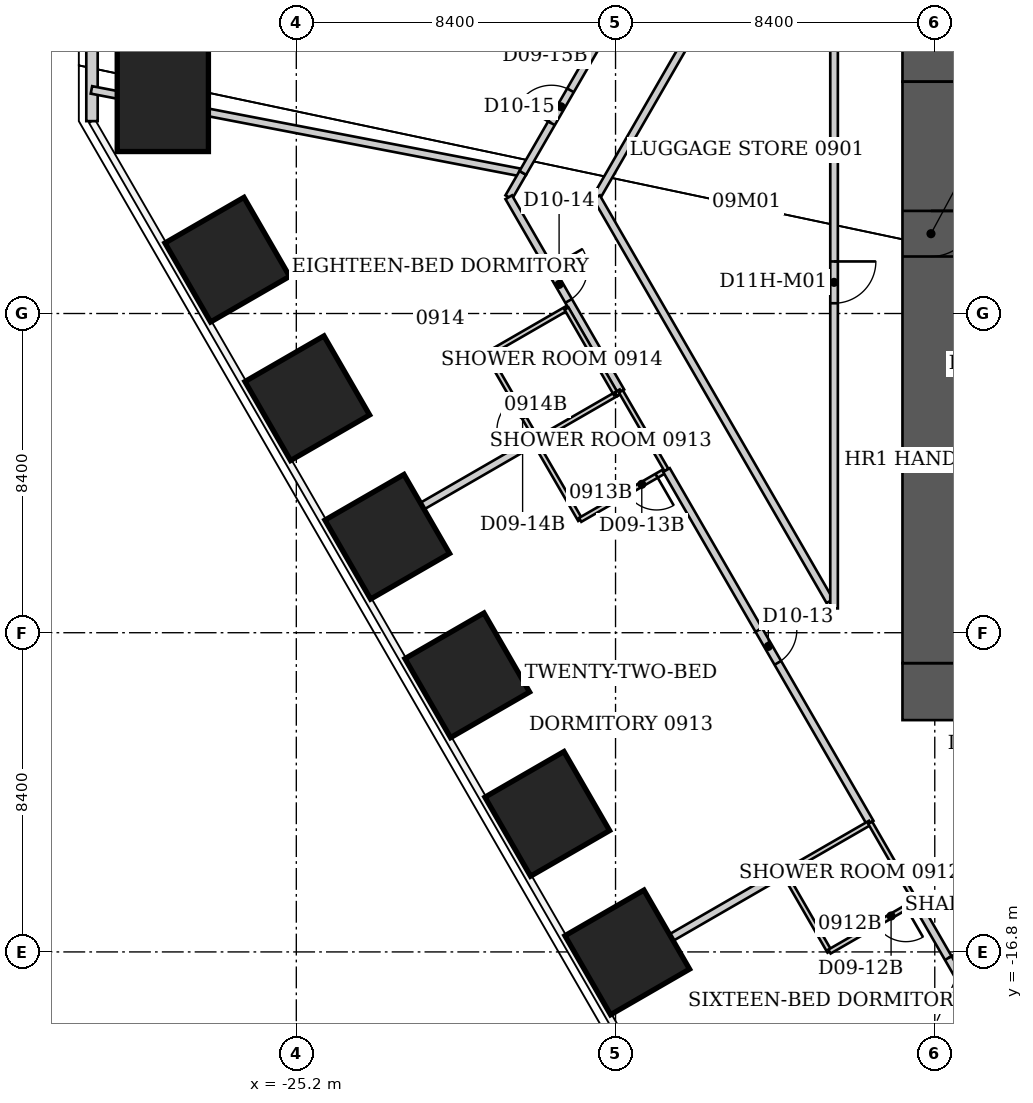
"""IFC4 building model, lengths in metres.
Left out: names, types, materials, properties, quantities, classifications, styles, units other than length and angle.
Written with IfcOpenShell. Run it as: python <this file> out.ifc"""

import sys

from ifc_helpers import new_model, si_unit, direction, frame, frame_2d, origin, origin_2d, place, context, subcontext, project, spatial, rectangle, extrude, element, fill, save


model = new_model("IFC4")
c1 = context("Model", 3, precision=1e-05, world=origin(), true_north=direction((0.0, 1.0)))
c2 = subcontext(c1, "Body", "Model", "MODEL_VIEW")
j1 = project(units=[si_unit("LENGTHUNIT", "METRE"), si_unit("PLANEANGLEUNIT", "RADIAN")], contexts=[c1])
p1 = place(None, origin())
s1 = spatial("IfcSite", under=j1, at=p1, CompositionType="ELEMENT")
p2 = place(p1, origin())
s2 = spatial("IfcBuilding", under=s1, at=p2, CompositionType="ELEMENT")
p3 = place(p2, frame((0.0, 0.0, 42.0)))
s3 = spatial("IfcBuildingStorey", under=s2, at=p3, CompositionType="ELEMENT", Elevation=42.0)
for number, where, z_axis, x_axis in (
    (1, (-16.491, -16.813, 0.0), (0.0, 0.0, 1.0), (-0.866, -0.5, 0.0)),
    (2, (-18.596, -13.167, 0.0), (0.0, 0.0, 1.0), (-0.866, -0.5, 0.0)),
    (3, (-20.701, -9.521, 0.0), (0.0, 0.0, 1.0), (-0.866, -0.5, 0.0)),
    (4, (-22.806, -5.875, 0.0), (0.0, 0.0, 1.0), (-0.866, -0.5, 0.0)),
    (5, (-24.911, -2.23, 0.0), (0.0, 0.0, 1.0), (-0.866, -0.5, 0.0)),
    (6, (-27.016, 1.416, 0.0), (0.0, 0.0, 1.0), (-0.866, -0.5, 0.0)),
):
    element("IfcColumn", number, at=place(p3, frame(where, z_axis=z_axis, x_axis=x_axis)), inside=s3, PredefinedType="COLUMN", context=c2, shape_type="SweptSolid", body=[
        extrude(rectangle(XDim=2.4, YDim=2.4, at=origin_2d()), origin(), (0.0, 0.0, 1.0), 3.8),
    ])
p4 = place(p3, frame((-28.713, 6.062, 0.0), z_axis=(0.0, 0.0, 1.0), x_axis=(-1.0, 0.0, 0.0)))
e7 = element("IfcColumn", 7, at=p4, inside=s3, PredefinedType="COLUMN", context=c2, shape_type="SweptSolid", body=[
    extrude(rectangle(XDim=2.4, YDim=3.6, at=origin_2d()), origin(), (0.0, 0.0, 1.0), 3.8),
])
p5 = place(p3, frame((-9.25, 6.85, 0.0), z_axis=(0.0, 0.0, 1.0), x_axis=(1.0, 0.0, 0.0)))
e8 = element("IfcWall", 8, at=p5, inside=s3, PredefinedType="SHEAR", context=c2, shape_type="SweptSolid", body=[
    extrude(rectangle(XDim=18.5, YDim=1.5, at=frame_2d((9.25, 0.0))), origin(), (0.0, 0.0, 1.0), 3.8),
])
p6 = place(p3, frame((-9.25, -9.95, 0.0), z_axis=(0.0, 0.0, 1.0), x_axis=(1.0, 0.0, 0.0)))
e9 = element("IfcWall", 9, at=p6, inside=s3, PredefinedType="SHEAR", context=c2, shape_type="SweptSolid", body=[
    extrude(rectangle(XDim=18.5, YDim=1.5, at=frame_2d((9.25, 0.0))), origin(), (0.0, 0.0, 1.0), 3.8),
])
p7 = place(p6, frame((2.137, 0.0, 0.0)))
e10 = element("IfcOpeningElement", 10, at=p7, cuts=e9, PredefinedType="OPENING", context=c2, shape_type="SweptSolid", body=[
    extrude(rectangle(XDim=1.1, YDim=2.1, at=frame_2d((0.55, 1.05))), frame((0.0, 0.75, 0.0), z_axis=(0.0, -1.0, 0.0), x_axis=(1.0, 0.0, 0.0)), (0.0, 0.0, 1.0), 1.5),
])
p8 = place(p6, frame((4.762, 0.0, 0.0)))
e11 = element("IfcOpeningElement", 11, at=p8, cuts=e9, PredefinedType="OPENING", context=c2, shape_type="SweptSolid", body=[
    extrude(rectangle(XDim=1.1, YDim=2.1, at=frame_2d((0.55, 1.05))), frame((0.0, 0.75, 0.0), z_axis=(0.0, -1.0, 0.0), x_axis=(1.0, 0.0, 0.0)), (0.0, 0.0, 1.0), 1.5),
])
p9 = place(p6, frame((7.387, 0.0, 0.0)))
e12 = element("IfcOpeningElement", 12, at=p9, cuts=e9, PredefinedType="OPENING", context=c2, shape_type="SweptSolid", body=[
    extrude(rectangle(XDim=1.1, YDim=2.1, at=frame_2d((0.55, 1.05))), frame((0.0, 0.75, 0.0), z_axis=(0.0, -1.0, 0.0), x_axis=(1.0, 0.0, 0.0)), (0.0, 0.0, 1.0), 1.5),
])
p10 = place(p3, frame((-8.5, -9.2, 0.0), z_axis=(0.0, 0.0, 1.0), x_axis=(0.0, 1.0, 0.0)))
e13 = element("IfcWall", 13, at=p10, inside=s3, PredefinedType="SHEAR", context=c2, shape_type="SweptSolid", body=[
    extrude(rectangle(XDim=15.3, YDim=1.5, at=frame_2d((7.65, 0.0))), origin(), (0.0, 0.0, 1.0), 3.8),
])
p11 = place(p10, frame((10.7, 0.0, 0.0)))
e14 = element("IfcOpeningElement", 14, at=p11, cuts=e13, PredefinedType="OPENING", context=c2, shape_type="SweptSolid", body=[
    extrude(rectangle(XDim=1.2, YDim=2.2, at=frame_2d((0.6, 1.1))), frame((0.0, 0.75, 0.0), z_axis=(0.0, -1.0, 0.0), x_axis=(1.0, 0.0, 0.0)), (0.0, 0.0, 1.0), 1.5),
])
p12 = place(p3, frame((-30.576, 5.062, 0.0), z_axis=(0.0, 0.0, 1.0), x_axis=(0.0, 1.0, 0.0)))
e15 = element("IfcWall", 15, at=p12, inside=s3, PredefinedType="SOLIDWALL", context=c2, shape_type="SweptSolid", body=[
    extrude(rectangle(XDim=2.0, YDim=0.3, at=frame_2d((1.0, 0.0))), origin(), (0.0, 0.0, 1.0), 3.64),
])
p13 = place(p3, frame((-30.591, 5.884, 0.0), z_axis=(0.0, 0.0, 1.0), x_axis=(0.981983289605, -0.188967772219, 0.0)))
e16 = element("IfcWall", 16, at=p13, inside=s3, PredefinedType="PARTITIONING", context=c2, shape_type="SweptSolid", body=[
    extrude(rectangle(XDim=11.509, YDim=0.2, at=frame_2d((5.754, 0.0))), origin(), (0.0, 0.0, 1.0), 3.64),
])
p14 = place(p3, frame((-23.916, -6.24, 0.0), z_axis=(0.0, 0.0, 1.0), x_axis=(0.865919350456, 0.50018364478, 0.0)))
e17 = element("IfcWall", 17, at=p14, inside=s3, PredefinedType="PARTITIONING", context=c2, shape_type="SweptSolid", body=[
    extrude(rectangle(XDim=5.758, YDim=0.2, at=frame_2d((2.879, 0.0))), origin(), (0.0, 0.0, 1.0), 3.64),
])
p15 = place(p3, frame((-20.17, -1.07, 0.0), z_axis=(0.0, 0.0, 1.0), x_axis=(0.500291685314, -0.865856933682, 0.0)))
e18 = element("IfcWall", 18, at=p15, inside=s3, PredefinedType="PARTITIONING", context=c2, shape_type="SweptSolid", body=[
    extrude(rectangle(XDim=2.599, YDim=0.12, at=frame_2d((1.299, 0.0))), origin(), (0.0, 0.0, 1.0), 3.64),
])
p16 = place(p15, frame((1.399, 0.0, 0.0)))
e19 = element("IfcOpeningElement", 19, at=p16, cuts=e18, PredefinedType="OPENING", context=c2, shape_type="SweptSolid", body=[
    extrude(rectangle(XDim=0.9, YDim=2.03, at=frame_2d((0.45, 1.015))), frame((0.0, 0.06, 0.0), z_axis=(0.0, -1.0, 0.0), x_axis=(1.0, 0.0, 0.0)), (0.0, 0.0, 1.0), 0.12),
])
p17 = place(p3, frame((-19.61, 3.06, 0.0), z_axis=(0.0, 0.0, 1.0), x_axis=(0.50068472101, 0.865629718844, 0.0)))
e20 = element("IfcWall", 20, at=p17, inside=s3, PredefinedType="PARTITIONING", context=c2, shape_type="SweptSolid", body=[
    extrude(rectangle(XDim=0.739, YDim=0.2, at=frame_2d((0.37, 0.0))), origin(), (0.0, 0.0, 1.0), 3.64),
])
p18 = place(p3, frame((-19.61, 3.06, 0.0), z_axis=(0.0, 0.0, 1.0), x_axis=(0.499983910424, -0.866034692906, 0.0)))
e21 = element("IfcWall", 21, at=p18, inside=s3, PredefinedType="PARTITIONING", context=c2, shape_type="SweptSolid", body=[
    extrude(rectangle(XDim=5.901, YDim=0.2, at=frame_2d((2.95, 0.0))), origin(), (0.0, 0.0, 1.0), 3.64),
])
p19 = place(p18, frame((2.15, 0.0, 0.0)))
e22 = element("IfcOpeningElement", 22, at=p19, cuts=e21, PredefinedType="OPENING", context=c2, shape_type="SweptSolid", body=[
    extrude(rectangle(XDim=1.0, YDim=2.13, at=frame_2d((0.5, 1.065))), frame((0.0, 0.1, 0.0), z_axis=(0.0, -1.0, 0.0), x_axis=(1.0, 0.0, 0.0)), (0.0, 0.0, 1.0), 0.2),
])
p20 = place(p3, frame((-19.24, 3.7, 0.0), z_axis=(0.0, 0.0, 1.0), x_axis=(0.500157149565, 0.865934654428, 0.0)))
e23 = element("IfcWall", 23, at=p20, inside=s3, PredefinedType="PARTITIONING", context=c2, shape_type="SweptSolid", body=[
    extrude(rectangle(XDim=4.019, YDim=0.2, at=frame_2d((2.009, 0.0))), origin(), (0.0, 0.0, 1.0), 3.64),
])
p21 = place(p20, frame((1.51, 0.0, 0.0)))
e24 = element("IfcOpeningElement", 24, at=p21, cuts=e23, PredefinedType="OPENING", context=c2, shape_type="SweptSolid", body=[
    extrude(rectangle(XDim=1.0, YDim=2.13, at=frame_2d((0.5, 1.065))), frame((0.0, 0.1, 0.0), z_axis=(0.0, -1.0, 0.0), x_axis=(1.0, 0.0, 0.0)), (0.0, 0.0, 1.0), 0.2),
])
p22 = place(p3, frame((-18.93, -3.36, 0.0), z_axis=(0.0, 0.0, 1.0), x_axis=(0.501547039172, -0.865130376012, 0.0)))
e25 = element("IfcWall", 25, at=p22, inside=s3, PredefinedType="PARTITIONING", context=c2, shape_type="SweptSolid", body=[
    extrude(rectangle(XDim=2.393, YDim=0.12, at=frame_2d((1.196, 0.0))), origin(), (0.0, 0.0, 1.0), 3.64),
])
p23 = place(p3, frame((-18.868, -3.324, 0.0), z_axis=(0.0, 0.0, 1.0), x_axis=(0.866133109688, 0.499813401482, 0.0)))
e26 = element("IfcWall", 26, at=p23, inside=s3, PredefinedType="PARTITIONING", context=c2, shape_type="SweptSolid", body=[
    extrude(rectangle(XDim=2.401, YDim=0.12, at=frame_2d((1.201, 0.0))), origin(), (0.0, 0.0, 1.0), 3.64),
])
p24 = place(p3, frame((-18.09, 0.13, 0.0), z_axis=(0.0, 0.0, 1.0), x_axis=(-0.866177122335, -0.499737123639, 0.0)))
e27 = element("IfcWall", 27, at=p24, inside=s3, PredefinedType="PARTITIONING", context=c2, shape_type="SweptSolid", body=[
    extrude(rectangle(XDim=2.401, YDim=0.12, at=frame_2d((1.201, 0.0))), origin(), (0.0, 0.0, 1.0), 3.64),
])
p25 = place(p3, frame((-17.73, -5.43, 0.0), z_axis=(0.0, 0.0, 1.0), x_axis=(0.866114241029, 0.499846097802, 0.0)))
e28 = element("IfcWall", 28, at=p25, inside=s3, PredefinedType="PARTITIONING", context=c2, shape_type="SweptSolid", body=[
    extrude(rectangle(XDim=2.621, YDim=0.12, at=frame_2d((1.311, 0.0))), origin(), (0.0, 0.0, 1.0), 2.878),
])
p26 = place(p25, frame((1.421, 0.0, 0.0)))
e29 = element("IfcOpeningElement", 29, at=p26, cuts=e28, PredefinedType="OPENING", context=c2, shape_type="SweptSolid", body=[
    extrude(rectangle(XDim=0.9, YDim=2.03, at=frame_2d((0.45, 1.015))), frame((0.0, 0.06, 0.0), z_axis=(0.0, -1.0, 0.0), x_axis=(1.0, 0.0, 0.0)), (0.0, 0.0, 1.0), 0.12),
])
p27 = place(p3, frame((-17.356, -17.59, 0.0), z_axis=(0.0, 0.0, 1.0), x_axis=(0.865929957466, 0.500165281445, 0.0)))
e30 = element("IfcWall", 30, at=p27, inside=s3, PredefinedType="PARTITIONING", context=c2, shape_type="SweptSolid", body=[
    extrude(rectangle(XDim=5.758, YDim=0.2, at=frame_2d((2.879, 0.0))), origin(), (0.0, 0.0, 1.0), 3.64),
])
p28 = place(p3, frame((-17.3, 3.06, 0.0), z_axis=(0.0, 0.0, 1.0), x_axis=(0.499704269421, 0.866196076603, 0.0)))
e31 = element("IfcWall", 31, at=p28, inside=s3, PredefinedType="PARTITIONING", context=c2, shape_type="SweptSolid", body=[
    extrude(rectangle(XDim=9.686, YDim=0.2, at=frame_2d((4.843, 0.0))), origin(), (0.0, 0.0, 1.0), 3.64),
])
p29 = place(p3, frame((-16.79, -2.12, 0.0), z_axis=(0.0, 0.0, 1.0), x_axis=(-0.50025099007, 0.865880446098, 0.0)))
e32 = element("IfcWall", 32, at=p29, inside=s3, PredefinedType="PARTITIONING", context=c2, shape_type="SweptSolid", body=[
    extrude(rectangle(XDim=2.599, YDim=0.12, at=frame_2d((1.299, 0.0))), origin(), (0.0, 0.0, 1.0), 3.64),
])
p30 = place(p3, frame((-16.788, -2.124, 0.0), z_axis=(0.0, 0.0, 1.0), x_axis=(0.866405716731, 0.499340699338, 0.0)))
e33 = element("IfcWall", 33, at=p30, inside=s3, PredefinedType="PARTITIONING", context=c2, shape_type="SweptSolid", body=[
    extrude(rectangle(XDim=0.148, YDim=0.12, at=frame_2d((0.074, 0.0))), origin(), (0.0, 0.0, 1.0), 3.64),
])
p31 = place(p3, frame((-16.66, -2.05, 0.0), z_axis=(0.0, 0.0, 1.0), x_axis=(0.501502765098, -0.865156041763, 0.0)))
e34 = element("IfcWall", 34, at=p31, inside=s3, PredefinedType="PARTITIONING", context=c2, shape_type="SweptSolid", body=[
    extrude(rectangle(XDim=2.393, YDim=0.12, at=frame_2d((1.196, 0.0))), origin(), (0.0, 0.0, 1.0), 3.64),
])
p32 = place(p3, frame((-15.46, -4.12, 0.0), z_axis=(0.0, 0.0, 1.0), x_axis=(0.500152338955, -0.865937432981, 0.0)))
e35 = element("IfcWall", 35, at=p32, inside=s3, PredefinedType="PARTITIONING", context=c2, shape_type="SweptSolid", body=[
    extrude(rectangle(XDim=10.717, YDim=0.2, at=frame_2d((5.358, 0.0))), origin(), (0.0, 0.0, 1.0), 3.64),
])
p33 = place(p32, frame((4.858, 0.0, 0.0)))
e36 = element("IfcOpeningElement", 36, at=p33, cuts=e35, PredefinedType="OPENING", context=c2, shape_type="SweptSolid", body=[
    extrude(rectangle(XDim=1.0, YDim=2.13, at=frame_2d((0.5, 1.065))), frame((0.0, 0.1, 0.0), z_axis=(0.0, -1.0, 0.0), x_axis=(1.0, 0.0, 0.0)), (0.0, 0.0, 1.0), 0.2),
])
p34 = place(p3, frame((-12.37, -14.71, 0.0), z_axis=(0.0, 0.0, 1.0), x_axis=(0.499769390944, -0.866158505053, 0.0)))
e37 = element("IfcWall", 37, at=p34, inside=s3, PredefinedType="PARTITIONING", context=c2, shape_type="SweptSolid", body=[
    extrude(rectangle(XDim=2.402, YDim=0.12, at=frame_2d((1.201, 0.0))), origin(), (0.0, 0.0, 1.0), 3.64),
])
p35 = place(p3, frame((-12.37, -14.71, 0.0), z_axis=(0.0, 0.0, 1.0), x_axis=(0.866114241029, 0.499846097802, 0.0)))
e38 = element("IfcWall", 38, at=p35, inside=s3, PredefinedType="PARTITIONING", context=c2, shape_type="SweptSolid", body=[
    extrude(rectangle(XDim=2.621, YDim=0.12, at=frame_2d((1.311, 0.0))), origin(), (0.0, 0.0, 1.0), 3.64),
])
p36 = place(p3, frame((-11.17, -16.79, 0.0), z_axis=(0.0, 0.0, 1.0), x_axis=(0.866114241029, 0.499846097802, 0.0)))
e39 = element("IfcWall", 39, at=p36, inside=s3, PredefinedType="PARTITIONING", context=c2, shape_type="SweptSolid", body=[
    extrude(rectangle(XDim=2.621, YDim=0.12, at=frame_2d((1.311, 0.0))), origin(), (0.0, 0.0, 1.0), 3.64),
])
p37 = place(p36, frame((1.421, 0.0, 0.0)))
e40 = element("IfcOpeningElement", 40, at=p37, cuts=e39, PredefinedType="OPENING", context=c2, shape_type="SweptSolid", body=[
    extrude(rectangle(XDim=0.9, YDim=2.03, at=frame_2d((0.45, 1.015))), frame((0.0, 0.06, 0.0), z_axis=(0.0, -1.0, 0.0), x_axis=(1.0, 0.0, 0.0)), (0.0, 0.0, 1.0), 0.12),
])
p38 = place(p3, frame((-11.16, -7.57, 0.0), z_axis=(0.0, 0.0, 1.0), x_axis=(-0.500175206663, 0.865924224537, 0.0)))
e41 = element("IfcWall", 41, at=p38, inside=s3, PredefinedType="PARTITIONING", context=c2, shape_type="SweptSolid", body=[
    extrude(rectangle(XDim=12.275, YDim=0.2, at=frame_2d((6.138, 0.0))), origin(), (0.0, 0.0, 1.0), 3.64),
])
p39 = place(p3, frame((-11.05, 9.4, 0.0), z_axis=(0.0, 0.0, 1.0), x_axis=(0.0, -1.0, 0.0)))
e42 = element("IfcWall", 42, at=p39, inside=s3, PredefinedType="PARTITIONING", context=c2, shape_type="SweptSolid", body=[
    extrude(rectangle(XDim=17.16, YDim=0.2, at=frame_2d((8.58, 0.0))), origin(), (0.0, 0.0, 1.0), 3.64),
])
p40 = place(p39, frame((8.03, 0.0, 0.0)))
e43 = element("IfcOpeningElement", 43, at=p40, cuts=e42, PredefinedType="OPENING", context=c2, shape_type="SweptSolid", body=[
    extrude(rectangle(XDim=1.1, YDim=2.2, at=frame_2d((0.55, 1.1))), frame((0.0, 0.1, 0.0), z_axis=(0.0, -1.0, 0.0), x_axis=(1.0, 0.0, 0.0)), (0.0, 0.0, 1.0), 0.2),
])
p41 = place(p3, frame((-10.1, -13.4, 0.0), z_axis=(0.0, 0.0, 1.0), x_axis=(0.499769390944, -0.866158505053, 0.0)))
e44 = element("IfcWall", 44, at=p41, inside=s3, PredefinedType="PARTITIONING", context=c2, shape_type="SweptSolid", body=[
    extrude(rectangle(XDim=2.402, YDim=0.12, at=frame_2d((1.201, 0.0))), origin(), (0.0, 0.0, 1.0), 3.64),
])
p42 = place(p3, frame((-8.9, -15.48, 0.0), z_axis=(0.0, 0.0, 1.0), x_axis=(0.499773435832, -0.866156171159, 0.0)))
e45 = element("IfcWall", 45, at=p42, inside=s3, PredefinedType="PARTITIONING", context=c2, shape_type="SweptSolid", body=[
    extrude(rectangle(XDim=4.422, YDim=0.2, at=frame_2d((2.211, 0.0))), origin(), (0.0, 0.0, 1.0), 3.64),
])
p43 = place(p42, frame((1.711, 0.0, 0.0)))
e46 = element("IfcOpeningElement", 46, at=p43, cuts=e45, PredefinedType="OPENING", context=c2, shape_type="SweptSolid", body=[
    extrude(rectangle(XDim=1.0, YDim=2.13, at=frame_2d((0.5, 1.065))), frame((0.0, 0.1, 0.0), z_axis=(0.0, -1.0, 0.0), x_axis=(1.0, 0.0, 0.0)), (0.0, 0.0, 1.0), 0.2),
])
p44 = place(p43, origin())
e47 = element("IfcDoor", 47, at=p44, inside=s3, OperationType="SINGLE_SWING_LEFT", PredefinedType="DOOR", context=c2, shape_type="SweptSolid", body=[
    extrude(rectangle(XDim=1.0, YDim=2.13, at=frame_2d((0.5, 1.065))), frame((0.0, 0.025, 0.0), z_axis=(0.0, -1.0, 0.0), x_axis=(1.0, 0.0, 0.0)), (0.0, 0.0, 1.0), 0.05),
])
fill(e46, e47)
p45 = place(p37, origin())
e48 = element("IfcDoor", 48, at=p45, inside=s3, OperationType="SINGLE_SWING_RIGHT", PredefinedType="DOOR", context=c2, shape_type="SweptSolid", body=[
    extrude(rectangle(XDim=0.9, YDim=2.03, at=frame_2d((0.45, 1.015))), frame((0.0, 0.025, 0.0), z_axis=(0.0, -1.0, 0.0), x_axis=(1.0, 0.0, 0.0)), (0.0, 0.0, 1.0), 0.05),
])
fill(e40, e48)
p46 = place(p33, origin())
e49 = element("IfcDoor", 49, at=p46, inside=s3, OperationType="SINGLE_SWING_LEFT", PredefinedType="DOOR", context=c2, shape_type="SweptSolid", body=[
    extrude(rectangle(XDim=1.0, YDim=2.13, at=frame_2d((0.5, 1.065))), frame((0.0, 0.025, 0.0), z_axis=(0.0, -1.0, 0.0), x_axis=(1.0, 0.0, 0.0)), (0.0, 0.0, 1.0), 0.05),
])
fill(e36, e49)
p47 = place(p26, origin())
e50 = element("IfcDoor", 50, at=p47, inside=s3, OperationType="SINGLE_SWING_RIGHT", PredefinedType="DOOR", context=c2, shape_type="SweptSolid", body=[
    extrude(rectangle(XDim=0.9, YDim=2.03, at=frame_2d((0.45, 1.015))), frame((0.0, 0.025, 0.0), z_axis=(0.0, -1.0, 0.0), x_axis=(1.0, 0.0, 0.0)), (0.0, 0.0, 1.0), 0.05),
])
fill(e29, e50)
p48 = place(p19, origin())
e51 = element("IfcDoor", 51, at=p48, inside=s3, OperationType="SINGLE_SWING_LEFT", PredefinedType="DOOR", context=c2, shape_type="SweptSolid", body=[
    extrude(rectangle(XDim=1.0, YDim=2.13, at=frame_2d((0.5, 1.065))), frame((0.0, 0.025, 0.0), z_axis=(0.0, -1.0, 0.0), x_axis=(1.0, 0.0, 0.0)), (0.0, 0.0, 1.0), 0.05),
])
fill(e22, e51)
p49 = place(p16, origin())
e52 = element("IfcDoor", 52, at=p49, inside=s3, OperationType="SINGLE_SWING_RIGHT", PredefinedType="DOOR", context=c2, shape_type="SweptSolid", body=[
    extrude(rectangle(XDim=0.9, YDim=2.03, at=frame_2d((0.45, 1.015))), frame((0.0, 0.025, 0.0), z_axis=(0.0, -1.0, 0.0), x_axis=(1.0, 0.0, 0.0)), (0.0, 0.0, 1.0), 0.05),
])
fill(e19, e52)
p50 = place(p21, origin())
e53 = element("IfcDoor", 53, at=p50, inside=s3, OperationType="SINGLE_SWING_LEFT", PredefinedType="DOOR", context=c2, shape_type="SweptSolid", body=[
    extrude(rectangle(XDim=1.0, YDim=2.13, at=frame_2d((0.5, 1.065))), frame((0.0, 0.025, 0.0), z_axis=(0.0, -1.0, 0.0), x_axis=(1.0, 0.0, 0.0)), (0.0, 0.0, 1.0), 0.05),
])
fill(e24, e53)
p51 = place(p40, origin())
e54 = element("IfcDoor", 54, at=p51, inside=s3, OperationType="SINGLE_SWING_LEFT", PredefinedType="DOOR", context=c2, shape_type="SweptSolid", body=[
    extrude(rectangle(XDim=1.1, YDim=2.2, at=frame_2d((0.55, 1.1))), frame((0.0, 0.025, 0.0), z_axis=(0.0, -1.0, 0.0), x_axis=(1.0, 0.0, 0.0)), (0.0, 0.0, 1.0), 0.05),
])
fill(e43, e54)
p52 = place(p11, origin())
e55 = element("IfcDoor", 55, at=p52, inside=s3, OperationType="SINGLE_SWING_RIGHT", PredefinedType="DOOR", context=c2, shape_type="SweptSolid", body=[
    extrude(rectangle(XDim=1.2, YDim=2.2, at=frame_2d((0.6, 1.1))), frame((0.0, 0.025, 0.0), z_axis=(0.0, -1.0, 0.0), x_axis=(1.0, 0.0, 0.0)), (0.0, 0.0, 1.0), 0.05),
])
fill(e14, e55)
save(model, sys.argv[1])
